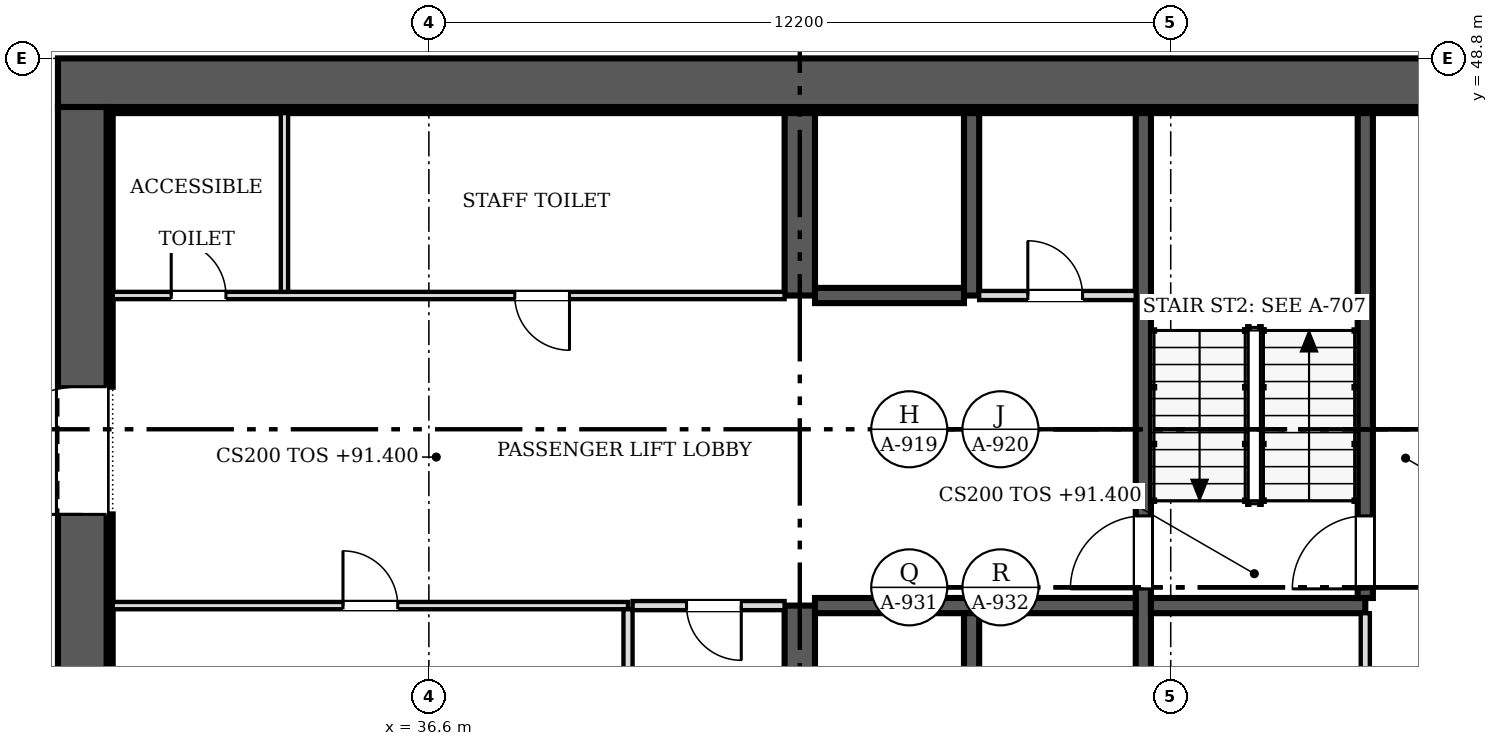
"""IFC4 building model, lengths in metres.
Left out: names, types, materials, properties, quantities, classifications, styles, units other than length and angle.
Written with IfcOpenShell. Run it as: python <this file> out.ifc"""

import sys

from ifc_helpers import new_model, si_unit, direction, frame, frame_2d, origin, place, context, subcontext, project, spatial, rectangle, extrude, source, transform, mapped, element, fill, save


model = new_model("IFC4")
c1 = context("Model", 3, precision=1e-05, world=origin(), true_north=direction((0.0, 1.0)))
c2 = subcontext(c1, "Body", "Model", "MODEL_VIEW")
j1 = project(units=[si_unit("LENGTHUNIT", "METRE"), si_unit("PLANEANGLEUNIT", "RADIAN")], contexts=[c1])
p1 = place(None, origin())
s1 = spatial("IfcSite", under=j1, at=p1, CompositionType="ELEMENT")
p2 = place(p1, origin())
s2 = spatial("IfcBuilding", under=s1, at=p2, CompositionType="ELEMENT")
p3 = place(p2, frame((0.0, 0.0, 91.4)))
s3 = spatial("IfcBuildingStorey", under=s2, at=p3, CompositionType="ELEMENT", Elevation=91.4)
p4 = place(p3, frame((30.9, 25.2, 0.0), z_axis=(0.0, 0.0, 1.0), x_axis=(0.0, 1.0, 0.0)))
e1 = element("IfcWall", 1, at=p4, inside=s3, PredefinedType="SHEAR", context=c2, shape_type="SweptSolid", body=[
    extrude(rectangle(XDim=22.8, YDim=0.8, at=frame_2d((11.4, 0.0))), origin(), (0.0, 0.0, 1.0), 3.8),
])
m1 = source(origin(), c2, "Body", "SweptSolid", [
    extrude(rectangle(XDim=2.1, YDim=2.4, at=frame_2d((1.05, 1.2))), frame((0.0, 0.41, 0.0), z_axis=(0.0, -1.0, 0.0), x_axis=(1.0, 0.0, 0.0)), (0.0, 0.0, 1.0), 0.82),
])
p5 = place(p4, frame((4.6, 0.0, 0.0)))
e2 = element("IfcOpeningElement", 2, at=p5, cuts=e1, PredefinedType="OPENING", context=c2, shape_type="MappedRepresentation", body=[
    mapped(m1, transform((0.0, 0.0, 0.0), scale=1.0)),
])
p6 = place(p4, frame((16.1, 0.0, 0.0)))
e3 = element("IfcOpeningElement", 3, at=p6, cuts=e1, PredefinedType="OPENING", context=c2, shape_type="MappedRepresentation", body=[
    mapped(m1, transform((0.0, 0.0, 0.0), scale=1.0)),
])
p7 = place(p3, frame((30.5, 48.4, 0.0), z_axis=(0.0, 0.0, 1.0), x_axis=(1.0, 0.0, 0.0)))
e4 = element("IfcWall", 4, at=p7, inside=s3, PredefinedType="SHEAR", context=c2, shape_type="SweptSolid", body=[
    extrude(rectangle(XDim=24.4, YDim=0.8, at=frame_2d((12.2, 0.0))), origin(), (0.0, 0.0, 1.0), 3.8),
])
p8 = place(p3, frame((31.3, 47.95, 0.0), z_axis=(0.0, 0.0, 1.0), x_axis=(1.0, 0.0, 0.0)))
e5 = element("IfcWall", 5, at=p8, inside=s3, PredefinedType="SOLIDWALL", context=c2, shape_type="SweptSolid", body=[
    extrude(rectangle(XDim=22.8, YDim=0.1, at=frame_2d((11.4, 0.0))), origin(), (0.0, 0.0, 1.0), 3.8),
])
p9 = place(p3, frame((31.35, 31.9, 0.0), z_axis=(0.0, 0.0, 1.0), x_axis=(0.0, 1.0, 0.0)))
e6 = element("IfcWall", 6, at=p9, inside=s3, PredefinedType="SOLIDWALL", context=c2, shape_type="SweptSolid", body=[
    extrude(rectangle(XDim=9.4, YDim=0.1, at=frame_2d((4.7, 0.0))), origin(), (0.0, 0.0, 1.0), 3.8),
])
p10 = place(p3, frame((31.35, 43.4, 0.0), z_axis=(0.0, 0.0, 1.0), x_axis=(0.0, 1.0, 0.0)))
e7 = element("IfcWall", 7, at=p10, inside=s3, PredefinedType="SOLIDWALL", context=c2, shape_type="SweptSolid", body=[
    extrude(rectangle(XDim=4.5, YDim=0.1, at=frame_2d((2.25, 0.0))), origin(), (0.0, 0.0, 1.0), 3.8),
])
p11 = place(p3, frame((42.7, 36.85, 0.0), z_axis=(0.0, 0.0, 1.0), x_axis=(0.0, 1.0, 0.0)))
e8 = element("IfcWall", 8, at=p11, inside=s3, PredefinedType="SHEAR", context=c2, shape_type="SweptSolid", body=[
    extrude(rectangle(XDim=2.95, YDim=0.5, at=frame_2d((1.475, 0.0))), origin(), (0.0, 0.0, 1.0), 3.8),
])
p12 = place(p3, frame((42.7, 44.9, 0.0), z_axis=(0.0, 0.0, 1.0), x_axis=(0.0, 1.0, 0.0)))
e9 = element("IfcWall", 9, at=p12, inside=s3, PredefinedType="SHEAR", context=c2, shape_type="SweptSolid", body=[
    extrude(rectangle(XDim=3.0, YDim=0.5, at=frame_2d((1.5, 0.0))), origin(), (0.0, 0.0, 1.0), 3.8),
])
p13 = place(p3, frame((48.35, 47.9, 0.0), z_axis=(0.0, 0.0, 1.0), x_axis=(0.0, -1.0, 0.0)))
e10 = element("IfcWall", 10, at=p13, inside=s3, PredefinedType="SOLIDWALL", context=c2, shape_type="SweptSolid", body=[
    extrude(rectangle(XDim=11.05, YDim=0.25, at=frame_2d((5.525, 0.0))), origin(), (0.0, 0.0, 1.0), 3.8),
])
m2 = source(origin(), c2, "Body", "SweptSolid", [
    extrude(rectangle(XDim=1.2, YDim=2.1, at=frame_2d((0.6, 1.05))), frame((0.0, 0.135, 0.0), z_axis=(0.0, -1.0, 0.0), x_axis=(1.0, 0.0, 0.0)), (0.0, 0.0, 1.0), 0.27),
])
p14 = place(p13, frame((6.625, 0.0, 0.0)))
e11 = element("IfcOpeningElement", 11, at=p14, cuts=e10, PredefinedType="OPENING", context=c2, shape_type="MappedRepresentation", body=[
    mapped(m2, transform((0.0, 0.0, 0.0), scale=1.0)),
])
p15 = place(p3, frame((42.95, 39.8, 0.0), z_axis=(0.0, 0.0, 1.0), x_axis=(1.0, 0.0, 0.0)))
e12 = element("IfcWall", 12, at=p15, inside=s3, PredefinedType="SOLIDWALL", context=c2, shape_type="SweptSolid", body=[
    extrude(rectangle(XDim=5.275, YDim=0.25, at=frame_2d((2.638, 0.0))), origin(), (0.0, 0.0, 1.0), 3.8),
])
p16 = place(p3, frame((48.475, 39.8, 0.0), z_axis=(0.0, 0.0, 1.0), x_axis=(1.0, 0.0, 0.0)))
e13 = element("IfcWall", 13, at=p16, inside=s3, PredefinedType="SOLIDWALL", context=c2, shape_type="SweptSolid", body=[
    extrude(rectangle(XDim=3.525, YDim=0.25, at=frame_2d((1.762, 0.0))), origin(), (0.0, 0.0, 1.0), 3.8),
])
p17 = place(p3, frame((52.0, 39.925, 0.0), z_axis=(0.0, 0.0, 1.0), x_axis=(0.0, 1.0, 0.0)))
e14 = element("IfcWall", 14, at=p17, inside=s3, PredefinedType="SOLIDWALL", context=c2, shape_type="SweptSolid", body=[
    extrude(rectangle(XDim=7.975, YDim=0.25, at=frame_2d((3.987, 0.0))), origin(), (0.0, 0.0, 1.0), 3.8),
])
p18 = place(p17, frame((0.15, 0.0, 0.0)))
e15 = element("IfcOpeningElement", 15, at=p18, cuts=e14, PredefinedType="OPENING", context=c2, shape_type="MappedRepresentation", body=[
    mapped(m2, transform((0.0, 0.0, 0.0), scale=1.0)),
])
p19 = place(p3, frame((45.525, 36.85, 0.0), z_axis=(0.0, 0.0, 1.0), x_axis=(0.0, 1.0, 0.0)))
e16 = element("IfcWall", 16, at=p19, inside=s3, PredefinedType="SOLIDWALL", context=c2, shape_type="SweptSolid", body=[
    extrude(rectangle(XDim=2.825, YDim=0.25, at=frame_2d((1.413, 0.0))), origin(), (0.0, 0.0, 1.0), 3.8),
])
p20 = place(p3, frame((45.525, 44.9, 0.0), z_axis=(0.0, 0.0, 1.0), x_axis=(0.0, 1.0, 0.0)))
e17 = element("IfcWall", 17, at=p20, inside=s3, PredefinedType="SOLIDWALL", context=c2, shape_type="SweptSolid", body=[
    extrude(rectangle(XDim=3.0, YDim=0.25, at=frame_2d((1.5, 0.0))), origin(), (0.0, 0.0, 1.0), 3.8),
])
p21 = place(p3, frame((42.95, 44.9, 0.0), z_axis=(0.0, 0.0, 1.0), x_axis=(1.0, 0.0, 0.0)))
e18 = element("IfcWall", 18, at=p21, inside=s3, PredefinedType="SOLIDWALL", context=c2, shape_type="SweptSolid", body=[
    extrude(rectangle(XDim=2.45, YDim=0.25, at=frame_2d((1.225, 0.0))), origin(), (0.0, 0.0, 1.0), 3.8),
])
p22 = place(p3, frame((31.4, 44.9, 0.0), z_axis=(0.0, 0.0, 1.0), x_axis=(1.0, 0.0, 0.0)))
e19 = element("IfcWall", 19, at=p22, inside=s3, PredefinedType="PARTITIONING", context=c2, shape_type="SweptSolid", body=[
    extrude(rectangle(XDim=11.05, YDim=0.12, at=frame_2d((5.525, 0.0))), origin(), (0.0, 0.0, 1.0), 3.6),
])
m3 = source(origin(), c2, "Body", "SweptSolid", [
    extrude(rectangle(XDim=0.9, YDim=2.1, at=frame_2d((0.45, 1.05))), frame((0.0, 0.07, 0.0), z_axis=(0.0, -1.0, 0.0), x_axis=(1.0, 0.0, 0.0)), (0.0, 0.0, 1.0), 0.14),
])
p23 = place(p22, frame((0.962, 0.0, 0.0)))
e20 = element("IfcOpeningElement", 20, at=p23, cuts=e19, PredefinedType="OPENING", context=c2, shape_type="MappedRepresentation", body=[
    mapped(m3, transform((0.0, 0.0, 0.0), scale=1.0)),
])
p24 = place(p22, frame((6.613, 0.0, 0.0)))
e21 = element("IfcOpeningElement", 21, at=p24, cuts=e19, PredefinedType="OPENING", context=c2, shape_type="MappedRepresentation", body=[
    mapped(m3, transform((0.0, 0.0, 0.0), scale=1.0)),
])
p25 = place(p3, frame((39.875, 39.8, 0.0), z_axis=(0.0, 0.0, 1.0), x_axis=(-1.0, 0.0, 0.0)))
e22 = element("IfcWall", 22, at=p25, inside=s3, PredefinedType="PARTITIONING", context=c2, shape_type="SweptSolid", body=[
    extrude(rectangle(XDim=8.475, YDim=0.12, at=frame_2d((4.238, 0.0))), origin(), (0.0, 0.0, 1.0), 3.6),
])
p26 = place(p25, frame((3.788, 0.0, 0.0)))
e23 = element("IfcOpeningElement", 23, at=p26, cuts=e22, PredefinedType="OPENING", context=c2, shape_type="MappedRepresentation", body=[
    mapped(m3, transform((0.0, 0.0, 0.0), scale=1.0)),
])
p27 = place(p3, frame((52.0, 33.525, 0.0), z_axis=(0.0, 0.0, 1.0), x_axis=(0.0, 1.0, 0.0)))
e24 = element("IfcWall", 24, at=p27, inside=s3, PredefinedType="PARTITIONING", context=c2, shape_type="SweptSolid", body=[
    extrude(rectangle(XDim=6.15, YDim=0.15, at=frame_2d((3.075, 0.0))), origin(), (0.0, 0.0, 1.0), 3.6),
])
m4 = source(origin(), c2, "Body", "SweptSolid", [
    extrude(rectangle(XDim=0.9, YDim=2.1, at=frame_2d((0.45, 1.05))), frame((0.0, 0.085, 0.0), z_axis=(0.0, -1.0, 0.0), x_axis=(1.0, 0.0, 0.0)), (0.0, 0.0, 1.0), 0.17),
])
p28 = place(p27, frame((1.025, 0.0, 0.0)))
e25 = element("IfcOpeningElement", 25, at=p28, cuts=e24, PredefinedType="OPENING", context=c2, shape_type="MappedRepresentation", body=[
    mapped(m4, transform((0.0, 0.0, 0.0), scale=1.0)),
])
p29 = place(p3, frame((39.875, 36.85, 0.0), z_axis=(0.0, 0.0, 1.0), x_axis=(0.0, 1.0, 0.0)))
e26 = element("IfcWall", 26, at=p29, inside=s3, PredefinedType="PARTITIONING", context=c2, shape_type="SweptSolid", body=[
    extrude(rectangle(XDim=2.89, YDim=0.15, at=frame_2d((1.445, 0.0))), origin(), (0.0, 0.0, 1.0), 3.6),
])
p30 = place(p3, frame((34.225, 44.96, 0.0), z_axis=(0.0, 0.0, 1.0), x_axis=(0.0, 1.0, 0.0)))
e27 = element("IfcWall", 27, at=p30, inside=s3, PredefinedType="PARTITIONING", context=c2, shape_type="SweptSolid", body=[
    extrude(rectangle(XDim=2.94, YDim=0.12, at=frame_2d((1.47, 0.0))), origin(), (0.0, 0.0, 1.0), 3.6),
])
p31 = place(p3, frame((45.65, 44.9, 0.0), z_axis=(0.0, 0.0, 1.0), x_axis=(1.0, 0.0, 0.0)))
e28 = element("IfcWall", 28, at=p31, inside=s3, PredefinedType="PARTITIONING", context=c2, shape_type="SweptSolid", body=[
    extrude(rectangle(XDim=2.575, YDim=0.15, at=frame_2d((1.288, 0.0))), origin(), (0.0, 0.0, 1.0), 3.6),
])
p32 = place(p31, frame((0.8, 0.0, 0.0)))
e29 = element("IfcOpeningElement", 29, at=p32, cuts=e28, PredefinedType="OPENING", context=c2, shape_type="MappedRepresentation", body=[
    mapped(m4, transform((0.0, 0.0, 0.0), scale=1.0)),
])
p33 = place(p3, frame((42.45, 39.8, 0.0), z_axis=(0.0, 0.0, 1.0), x_axis=(-1.0, 0.0, 0.0)))
e30 = element("IfcWall", 30, at=p33, inside=s3, PredefinedType="PARTITIONING", context=c2, shape_type="SweptSolid", body=[
    extrude(rectangle(XDim=2.5, YDim=0.15, at=frame_2d((1.25, 0.0))), origin(), (0.0, 0.0, 1.0), 3.6),
])
p34 = place(p33, frame((0.712, 0.0, 0.0)))
e31 = element("IfcOpeningElement", 31, at=p34, cuts=e30, PredefinedType="OPENING", context=c2, shape_type="MappedRepresentation", body=[
    mapped(m4, transform((0.0, 0.0, 0.0), scale=1.0)),
])
m5 = source(origin(), c2, "Body", "SweptSolid", [
    extrude(rectangle(XDim=2.1, YDim=2.4, at=frame_2d((1.05, 1.2))), frame((0.0, 0.025, 0.0), z_axis=(0.0, -1.0, 0.0), x_axis=(1.0, 0.0, 0.0)), (0.0, 0.0, 1.0), 0.05),
])
p35 = place(p6, origin())
e32 = element("IfcDoor", 32, at=p35, inside=s3, OperationType="DOUBLE_DOOR_SINGLE_SWING", PredefinedType="DOOR", context=c2, shape_type="MappedRepresentation", body=[
    mapped(m5, transform((0.0, 0.0, 0.0), scale=1.0)),
])
fill(e3, e32)
m6 = source(origin(), c2, "Body", "SweptSolid", [
    extrude(rectangle(XDim=1.2, YDim=2.1, at=frame_2d((0.6, 1.05))), frame((0.0, 0.025, 0.0), z_axis=(0.0, -1.0, 0.0), x_axis=(1.0, 0.0, 0.0)), (0.0, 0.0, 1.0), 0.05),
])
p36 = place(p14, origin())
e33 = element("IfcDoor", 33, at=p36, inside=s3, OperationType="SINGLE_SWING_RIGHT", PredefinedType="DOOR", context=c2, shape_type="MappedRepresentation", body=[
    mapped(m6, transform((0.0, 0.0, 0.0), scale=1.0)),
])
fill(e11, e33)
p37 = place(p18, origin())
e34 = element("IfcDoor", 34, at=p37, inside=s3, OperationType="SINGLE_SWING_LEFT", PredefinedType="DOOR", context=c2, shape_type="MappedRepresentation", body=[
    mapped(m6, transform((0.0, 0.0, 0.0), scale=1.0)),
])
fill(e15, e34)
m7 = source(origin(), c2, "Body", "SweptSolid", [
    extrude(rectangle(XDim=0.9, YDim=2.1, at=frame_2d((0.45, 1.05))), frame((0.0, 0.025, 0.0), z_axis=(0.0, -1.0, 0.0), x_axis=(1.0, 0.0, 0.0)), (0.0, 0.0, 1.0), 0.05),
])
p38 = place(p23, origin())
e35 = element("IfcDoor", 35, at=p38, inside=s3, OperationType="SINGLE_SWING_LEFT", PredefinedType="DOOR", context=c2, shape_type="MappedRepresentation", body=[
    mapped(m7, transform((0.0, 0.0, 0.0), scale=1.0)),
])
fill(e20, e35)
p39 = place(p24, origin())
e36 = element("IfcDoor", 36, at=p39, inside=s3, OperationType="SINGLE_SWING_RIGHT", PredefinedType="DOOR", context=c2, shape_type="MappedRepresentation", body=[
    mapped(m7, transform((0.0, 0.0, 0.0), scale=1.0)),
])
fill(e21, e36)
p40 = place(p26, origin())
e37 = element("IfcDoor", 37, at=p40, inside=s3, OperationType="SINGLE_SWING_RIGHT", PredefinedType="DOOR", context=c2, shape_type="MappedRepresentation", body=[
    mapped(m7, transform((0.0, 0.0, 0.0), scale=1.0)),
])
fill(e23, e37)
p41 = place(p32, origin())
e38 = element("IfcDoor", 38, at=p41, inside=s3, OperationType="SINGLE_SWING_LEFT", PredefinedType="DOOR", context=c2, shape_type="MappedRepresentation", body=[
    mapped(m7, transform((0.0, 0.0, 0.0), scale=1.0)),
])
fill(e29, e38)
p42 = place(p34, origin())
e39 = element("IfcDoor", 39, at=p42, inside=s3, OperationType="SINGLE_SWING_LEFT", PredefinedType="DOOR", context=c2, shape_type="MappedRepresentation", body=[
    mapped(m7, transform((0.0, 0.0, 0.0), scale=1.0)),
])
fill(e31, e39)
save(model, sys.argv[1])
